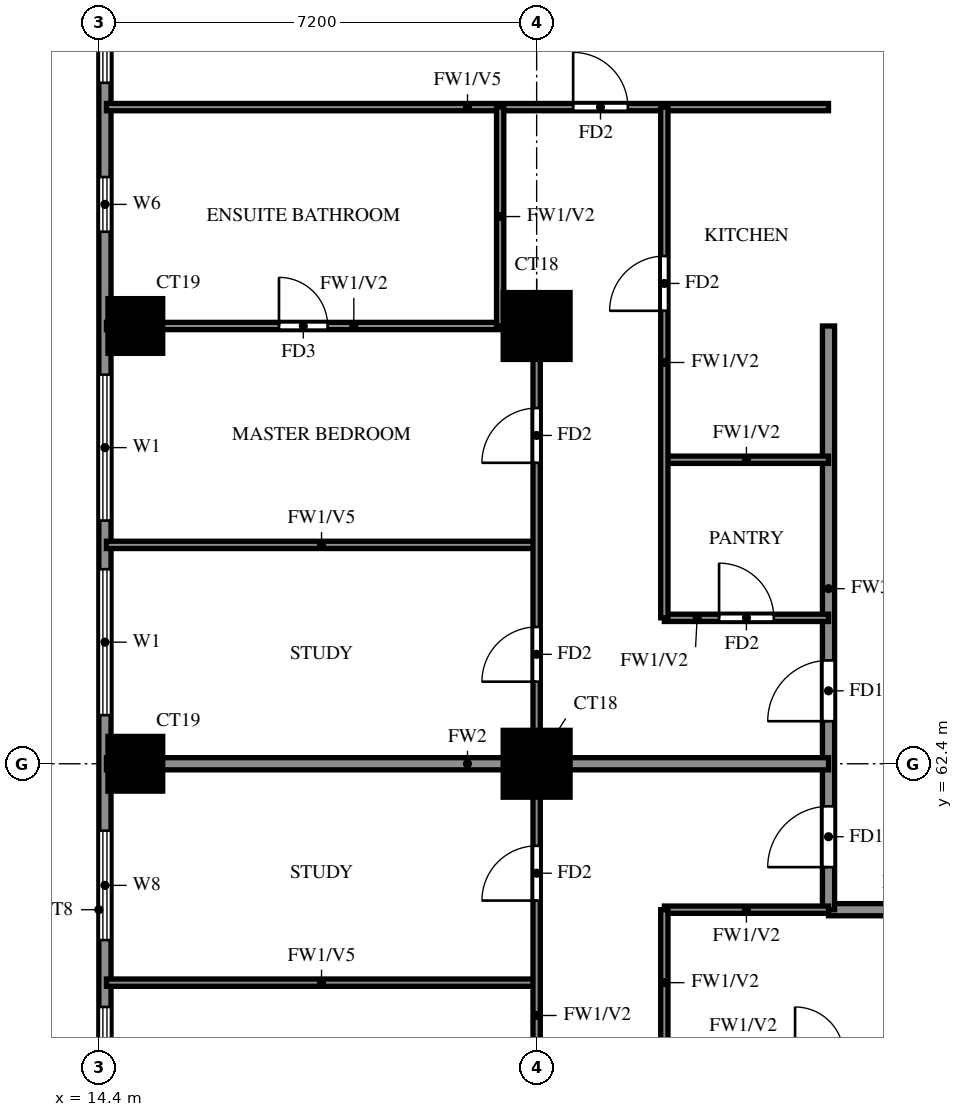
"""IFC4 building model, lengths in metres.
Left out: names, types, materials, properties, quantities, classifications, styles, units other than length and angle.
Written with IfcOpenShell. Run it as: python <this file> out.ifc"""

import sys

from ifc_helpers import new_model, si_unit, direction, frame, frame_2d, origin, origin_2d, place, context, subcontext, project, spatial, rectangle, extrude, source, transform, mapped, element, fill, save


model = new_model("IFC4")
c1 = context("Model", 3, precision=1e-05, world=origin(), true_north=direction((0.0, 1.0)))
c2 = subcontext(c1, "Body", "Model", "MODEL_VIEW")
j1 = project(units=[si_unit("LENGTHUNIT", "METRE"), si_unit("PLANEANGLEUNIT", "RADIAN")], contexts=[c1])
p1 = place(None, origin())
s1 = spatial("IfcSite", under=j1, at=p1, CompositionType="ELEMENT")
p2 = place(p1, origin())
s2 = spatial("IfcBuilding", under=s1, at=p2, CompositionType="ELEMENT")
p3 = place(p2, frame((0.0, 0.0, 113.0)))
s3 = spatial("IfcBuildingStorey", under=s2, at=p3, CompositionType="ELEMENT", Elevation=113.0)
m1 = source(origin(), c2, "Body", "SweptSolid", [
    extrude(rectangle(XDim=0.9, YDim=0.9, at=origin_2d()), origin(), (0.0, 0.0, 1.0), 3.2),
])
p4 = place(p3, frame((15.0, 62.4, 0.0), z_axis=(0.0, 0.0, 1.0), x_axis=(1.0, 0.0, 0.0)))
e1 = element("IfcColumn", 1, at=p4, inside=s3, PredefinedType="COLUMN", context=c2, shape_type="MappedRepresentation", body=[
    mapped(m1, transform((0.0, 0.0, 0.0))),
])
m2 = source(origin(), c2, "Body", "SweptSolid", [
    extrude(rectangle(XDim=1.1, YDim=1.1, at=origin_2d()), origin(), (0.0, 0.0, 1.0), 3.2),
])
p5 = place(p3, frame((21.6, 62.4, 0.0), z_axis=(0.0, 0.0, 1.0), x_axis=(1.0, 0.0, 0.0)))
e2 = element("IfcColumn", 2, at=p5, inside=s3, PredefinedType="COLUMN", context=c2, shape_type="MappedRepresentation", body=[
    mapped(m2, transform((0.0, 0.0, 0.0))),
])
p6 = place(p3, frame((15.0, 69.6, 0.0), z_axis=(0.0, 0.0, 1.0), x_axis=(1.0, 0.0, 0.0)))
e3 = element("IfcColumn", 3, at=p6, inside=s3, PredefinedType="COLUMN", context=c2, shape_type="MappedRepresentation", body=[
    mapped(m1, transform((0.0, 0.0, 0.0))),
])
p7 = place(p3, frame((21.6, 69.6, 0.0), z_axis=(0.0, 0.0, 1.0), x_axis=(1.0, 0.0, 0.0)))
e4 = element("IfcColumn", 4, at=p7, inside=s3, PredefinedType="COLUMN", context=c2, shape_type="MappedRepresentation", body=[
    mapped(m2, transform((0.0, 0.0, 0.0))),
])
p8 = place(p3, frame((14.5, 76.6, 0.0), z_axis=(0.0, 0.0, 1.0), x_axis=(0.0, -1.0, 0.0)))
e5 = element("IfcWall", 5, at=p8, inside=s3, PredefinedType="SOLIDWALL", context=c2, shape_type="SweptSolid", body=[
    extrude(rectangle(XDim=33.4, YDim=0.2, at=frame_2d((16.7, 0.0))), origin(), (0.0, 0.0, 1.0), 3.2),
])
p9 = place(p8, frame((29.9, 0.0, 0.6)))
e6 = element("IfcOpeningElement", 6, at=p9, cuts=e5, PredefinedType="OPENING", context=c2, shape_type="SweptSolid", body=[
    extrude(rectangle(XDim=2.4, YDim=2.4, at=frame_2d((1.2, 1.2))), frame((0.0, 0.11, 0.0), z_axis=(0.0, -1.0, 0.0), x_axis=(1.0, 0.0, 0.0)), (0.0, 0.0, 1.0), 0.22),
])
p10 = place(p8, frame((25.4, 0.0, 0.6)))
e7 = element("IfcOpeningElement", 7, at=p10, cuts=e5, PredefinedType="OPENING", context=c2, shape_type="SweptSolid", body=[
    extrude(rectangle(XDim=2.4, YDim=2.4, at=frame_2d((1.2, 1.2))), frame((0.0, 0.11, 0.0), z_axis=(0.0, -1.0, 0.0), x_axis=(1.0, 0.0, 0.0)), (0.0, 0.0, 1.0), 0.22),
])
p11 = place(p8, frame((18.2, 0.0, 0.6)))
e8 = element("IfcOpeningElement", 8, at=p11, cuts=e5, PredefinedType="OPENING", context=c2, shape_type="SweptSolid", body=[
    extrude(rectangle(XDim=2.4, YDim=2.4, at=frame_2d((1.2, 1.2))), frame((0.0, 0.11, 0.0), z_axis=(0.0, -1.0, 0.0), x_axis=(1.0, 0.0, 0.0)), (0.0, 0.0, 1.0), 0.22),
])
p12 = place(p8, frame((22.5, 0.0, 0.6)))
e9 = element("IfcOpeningElement", 9, at=p12, cuts=e5, PredefinedType="OPENING", context=c2, shape_type="SweptSolid", body=[
    extrude(rectangle(XDim=1.8, YDim=2.4, at=frame_2d((0.9, 1.2))), frame((0.0, 0.11, 0.0), z_axis=(0.0, -1.0, 0.0), x_axis=(1.0, 0.0, 0.0)), (0.0, 0.0, 1.0), 0.22),
])
p13 = place(p8, frame((15.3, 0.0, 0.6)))
e10 = element("IfcOpeningElement", 10, at=p13, cuts=e5, PredefinedType="OPENING", context=c2, shape_type="SweptSolid", body=[
    extrude(rectangle(XDim=1.8, YDim=2.4, at=frame_2d((0.9, 1.2))), frame((0.0, 0.11, 0.0), z_axis=(0.0, -1.0, 0.0), x_axis=(1.0, 0.0, 0.0)), (0.0, 0.0, 1.0), 0.22),
])
p14 = place(p8, frame((11.0, 0.0, 0.6)))
e11 = element("IfcOpeningElement", 11, at=p14, cuts=e5, PredefinedType="OPENING", context=c2, shape_type="SweptSolid", body=[
    extrude(rectangle(XDim=2.4, YDim=2.4, at=frame_2d((1.2, 1.2))), frame((0.0, 0.11, 0.0), z_axis=(0.0, -1.0, 0.0), x_axis=(1.0, 0.0, 0.0)), (0.0, 0.0, 1.0), 0.22),
])
p15 = place(p8, frame((7.8, 0.0, 0.6)))
e12 = element("IfcOpeningElement", 12, at=p15, cuts=e5, PredefinedType="OPENING", context=c2, shape_type="SweptSolid", body=[
    extrude(rectangle(XDim=2.4, YDim=2.4, at=frame_2d((1.2, 1.2))), frame((0.0, 0.11, 0.0), z_axis=(0.0, -1.0, 0.0), x_axis=(1.0, 0.0, 0.0)), (0.0, 0.0, 1.0), 0.22),
])
p16 = place(p8, frame((4.55, 0.0, 1.5)))
e13 = element("IfcOpeningElement", 13, at=p16, cuts=e5, PredefinedType="OPENING", context=c2, shape_type="SweptSolid", body=[
    extrude(rectangle(XDim=0.9, YDim=0.9, at=frame_2d((0.45, 0.45))), frame((0.0, 0.11, 0.0), z_axis=(0.0, -1.0, 0.0), x_axis=(1.0, 0.0, 0.0)), (0.0, 0.0, 1.0), 0.22),
])
p17 = place(p8, frame((0.6, 0.0, 0.6)))
e14 = element("IfcOpeningElement", 14, at=p17, cuts=e5, PredefinedType="OPENING", context=c2, shape_type="SweptSolid", body=[
    extrude(rectangle(XDim=2.4, YDim=2.4, at=frame_2d((1.2, 1.2))), frame((0.0, 0.11, 0.0), z_axis=(0.0, -1.0, 0.0), x_axis=(1.0, 0.0, 0.0)), (0.0, 0.0, 1.0), 0.22),
])
p18 = place(p3, frame((26.4, 60.0, 0.0), z_axis=(0.0, 0.0, 1.0), x_axis=(1.0, 0.0, 0.0)))
e15 = element("IfcWall", 15, at=p18, inside=s3, PredefinedType="SOLIDWALL", context=c2, shape_type="SweptSolid", body=[
    extrude(rectangle(XDim=2.4, YDim=0.2, at=frame_2d((1.2, 0.0))), origin(), (0.0, 0.0, 1.0), 3.2),
])
p19 = place(p3, frame((26.4, 60.0, 0.0), z_axis=(0.0, 0.0, 1.0), x_axis=(0.0, 1.0, 0.0)))
e16 = element("IfcWall", 16, at=p19, inside=s3, PredefinedType="SOLIDWALL", context=c2, shape_type="SweptSolid", body=[
    extrude(rectangle(XDim=9.6, YDim=0.2, at=frame_2d((4.8, 0.0))), origin(), (0.0, 0.0, 1.0), 3.2),
])
p20 = place(p19, frame((0.7, 0.0, 0.0)))
e17 = element("IfcOpeningElement", 17, at=p20, cuts=e16, PredefinedType="OPENING", context=c2, shape_type="SweptSolid", body=[
    extrude(rectangle(XDim=1.0, YDim=2.1, at=frame_2d((0.5, 1.05))), frame((0.0, 0.11, 0.0), z_axis=(0.0, -1.0, 0.0), x_axis=(1.0, 0.0, 0.0)), (0.0, 0.0, 1.0), 0.22),
])
p21 = place(p19, frame((3.1, 0.0, 0.0)))
e18 = element("IfcOpeningElement", 18, at=p21, cuts=e16, PredefinedType="OPENING", context=c2, shape_type="SweptSolid", body=[
    extrude(rectangle(XDim=1.0, YDim=2.1, at=frame_2d((0.5, 1.05))), frame((0.0, 0.11, 0.0), z_axis=(0.0, -1.0, 0.0), x_axis=(1.0, 0.0, 0.0)), (0.0, 0.0, 1.0), 0.22),
])
p22 = place(p3, frame((14.525, 62.4, 0.0), z_axis=(0.0, 0.0, 1.0), x_axis=(1.0, 0.0, 0.0)))
e19 = element("IfcWall", 19, at=p22, inside=s3, PredefinedType="SOLIDWALL", context=c2, shape_type="SweptSolid", body=[
    extrude(rectangle(XDim=11.875, YDim=0.2, at=frame_2d((5.938, 0.0))), origin(), (0.0, 0.0, 1.0), 3.2),
])
p23 = place(p3, frame((14.525, 58.8, 0.0), z_axis=(0.0, 0.0, 1.0), x_axis=(1.0, 0.0, 0.0)))
e20 = element("IfcWall", 20, at=p23, inside=s3, PredefinedType="PARTITIONING", context=c2, shape_type="SweptSolid", body=[
    extrude(rectangle(XDim=7.075, YDim=0.12, at=frame_2d((3.538, 0.0))), origin(), (0.0, 0.0, 1.0), 2.3),
])
p24 = place(p3, frame((23.7, 60.0, 0.0), z_axis=(0.0, 0.0, 1.0), x_axis=(1.0, 0.0, 0.0)))
e21 = element("IfcWall", 21, at=p24, inside=s3, PredefinedType="PARTITIONING", context=c2, shape_type="SweptSolid", body=[
    extrude(rectangle(XDim=2.7, YDim=0.12, at=frame_2d((1.35, 0.0))), origin(), (0.0, 0.0, 1.0), 3.2),
])
p25 = place(p3, frame((23.7, 64.8, 0.0), z_axis=(0.0, 0.0, 1.0), x_axis=(1.0, 0.0, 0.0)))
e22 = element("IfcWall", 22, at=p25, inside=s3, PredefinedType="PARTITIONING", context=c2, shape_type="SweptSolid", body=[
    extrude(rectangle(XDim=2.7, YDim=0.12, at=frame_2d((1.35, 0.0))), origin(), (0.0, 0.0, 1.0), 3.2),
])
p26 = place(p25, frame((0.9, 0.0, 0.0)))
e23 = element("IfcOpeningElement", 23, at=p26, cuts=e22, PredefinedType="OPENING", context=c2, shape_type="SweptSolid", body=[
    extrude(rectangle(XDim=0.9, YDim=2.1, at=frame_2d((0.45, 1.05))), frame((0.0, 0.07, 0.0), z_axis=(0.0, -1.0, 0.0), x_axis=(1.0, 0.0, 0.0)), (0.0, 0.0, 1.0), 0.14),
])
p27 = place(p3, frame((14.525, 66.0, 0.0), z_axis=(0.0, 0.0, 1.0), x_axis=(1.0, 0.0, 0.0)))
e24 = element("IfcWall", 24, at=p27, inside=s3, PredefinedType="PARTITIONING", context=c2, shape_type="SweptSolid", body=[
    extrude(rectangle(XDim=7.075, YDim=0.12, at=frame_2d((3.538, 0.0))), origin(), (0.0, 0.0, 1.0), 2.3),
])
p28 = place(p3, frame((23.7, 67.4, 0.0), z_axis=(0.0, 0.0, 1.0), x_axis=(1.0, 0.0, 0.0)))
e25 = element("IfcWall", 25, at=p28, inside=s3, PredefinedType="PARTITIONING", context=c2, shape_type="SweptSolid", body=[
    extrude(rectangle(XDim=2.7, YDim=0.12, at=frame_2d((1.35, 0.0))), origin(), (0.0, 0.0, 1.0), 3.2),
])
p29 = place(p3, frame((14.525, 69.6, 0.0), z_axis=(0.0, 0.0, 1.0), x_axis=(1.0, 0.0, 0.0)))
e26 = element("IfcWall", 26, at=p29, inside=s3, PredefinedType="PARTITIONING", context=c2, shape_type="SweptSolid", body=[
    extrude(rectangle(XDim=7.075, YDim=0.12, at=frame_2d((3.538, 0.0))), origin(), (0.0, 0.0, 1.0), 3.2),
])
p30 = place(p29, frame((2.837, 0.0, 0.0)))
e27 = element("IfcOpeningElement", 27, at=p30, cuts=e26, PredefinedType="OPENING", context=c2, shape_type="SweptSolid", body=[
    extrude(rectangle(XDim=0.8, YDim=2.1, at=frame_2d((0.4, 1.05))), frame((0.0, 0.07, 0.0), z_axis=(0.0, -1.0, 0.0), x_axis=(1.0, 0.0, 0.0)), (0.0, 0.0, 1.0), 0.14),
])
p31 = place(p3, frame((14.525, 73.2, 0.0), z_axis=(0.0, 0.0, 1.0), x_axis=(1.0, 0.0, 0.0)))
e28 = element("IfcWall", 28, at=p31, inside=s3, PredefinedType="PARTITIONING", context=c2, shape_type="SweptSolid", body=[
    extrude(rectangle(XDim=11.875, YDim=0.12, at=frame_2d((5.938, 0.0))), origin(), (0.0, 0.0, 1.0), 2.3),
])
p32 = place(p31, frame((7.675, 0.0, 0.0)))
e29 = element("IfcOpeningElement", 29, at=p32, cuts=e28, PredefinedType="OPENING", context=c2, shape_type="SweptSolid", body=[
    extrude(rectangle(XDim=0.9, YDim=2.1, at=frame_2d((0.45, 1.05))), frame((0.0, 0.07, 0.0), z_axis=(0.0, -1.0, 0.0), x_axis=(1.0, 0.0, 0.0)), (0.0, 0.0, 1.0), 0.14),
])
p33 = place(p3, frame((21.0, 69.6, 0.0), z_axis=(0.0, 0.0, 1.0), x_axis=(0.0, 1.0, 0.0)))
e30 = element("IfcWall", 30, at=p33, inside=s3, PredefinedType="PARTITIONING", context=c2, shape_type="SweptSolid", body=[
    extrude(rectangle(XDim=3.6, YDim=0.12, at=frame_2d((1.8, 0.0))), origin(), (0.0, 0.0, 1.0), 3.2),
])
p34 = place(p3, frame((21.6, 48.0, 0.0), z_axis=(0.0, 0.0, 1.0), x_axis=(0.0, 1.0, 0.0)))
e31 = element("IfcWall", 31, at=p34, inside=s3, PredefinedType="PARTITIONING", context=c2, shape_type="SweptSolid", body=[
    extrude(rectangle(XDim=21.6, YDim=0.12, at=frame_2d((10.8, 0.0))), origin(), (0.0, 0.0, 1.0), 3.2),
])
p35 = place(p34, frame((1.35, 0.0, 0.0)))
e32 = element("IfcOpeningElement", 32, at=p35, cuts=e31, PredefinedType="OPENING", context=c2, shape_type="SweptSolid", body=[
    extrude(rectangle(XDim=0.9, YDim=2.1, at=frame_2d((0.45, 1.05))), frame((0.0, 0.07, 0.0), z_axis=(0.0, -1.0, 0.0), x_axis=(1.0, 0.0, 0.0)), (0.0, 0.0, 1.0), 0.14),
])
p36 = place(p34, frame((7.95, 0.0, 0.0)))
e33 = element("IfcOpeningElement", 33, at=p36, cuts=e31, PredefinedType="OPENING", context=c2, shape_type="SweptSolid", body=[
    extrude(rectangle(XDim=1.5, YDim=2.1, at=frame_2d((0.75, 1.05))), frame((0.0, 0.07, 0.0), z_axis=(0.0, -1.0, 0.0), x_axis=(1.0, 0.0, 0.0)), (0.0, 0.0, 1.0), 0.14),
])
p37 = place(p34, frame((12.15, 0.0, 0.0)))
e34 = element("IfcOpeningElement", 34, at=p37, cuts=e31, PredefinedType="OPENING", context=c2, shape_type="SweptSolid", body=[
    extrude(rectangle(XDim=0.9, YDim=2.1, at=frame_2d((0.45, 1.05))), frame((0.0, 0.07, 0.0), z_axis=(0.0, -1.0, 0.0), x_axis=(1.0, 0.0, 0.0)), (0.0, 0.0, 1.0), 0.14),
])
p38 = place(p34, frame((15.75, 0.0, 0.0)))
e35 = element("IfcOpeningElement", 35, at=p38, cuts=e31, PredefinedType="OPENING", context=c2, shape_type="SweptSolid", body=[
    extrude(rectangle(XDim=0.9, YDim=2.1, at=frame_2d((0.45, 1.05))), frame((0.0, 0.07, 0.0), z_axis=(0.0, -1.0, 0.0), x_axis=(1.0, 0.0, 0.0)), (0.0, 0.0, 1.0), 0.14),
])
p39 = place(p34, frame((19.35, 0.0, 0.0)))
e36 = element("IfcOpeningElement", 36, at=p39, cuts=e31, PredefinedType="OPENING", context=c2, shape_type="SweptSolid", body=[
    extrude(rectangle(XDim=0.9, YDim=2.1, at=frame_2d((0.45, 1.05))), frame((0.0, 0.07, 0.0), z_axis=(0.0, -1.0, 0.0), x_axis=(1.0, 0.0, 0.0)), (0.0, 0.0, 1.0), 0.14),
])
p40 = place(p3, frame((23.7, 57.6, 0.0), z_axis=(0.0, 0.0, 1.0), x_axis=(0.0, 1.0, 0.0)))
e37 = element("IfcWall", 37, at=p40, inside=s3, PredefinedType="PARTITIONING", context=c2, shape_type="SweptSolid", body=[
    extrude(rectangle(XDim=2.4, YDim=0.12, at=frame_2d((1.2, 0.0))), origin(), (0.0, 0.0, 1.0), 3.2),
])
p41 = place(p3, frame((23.7, 64.8, 0.0), z_axis=(0.0, 0.0, 1.0), x_axis=(0.0, 1.0, 0.0)))
e38 = element("IfcWall", 38, at=p41, inside=s3, PredefinedType="PARTITIONING", context=c2, shape_type="SweptSolid", body=[
    extrude(rectangle(XDim=8.4, YDim=0.12, at=frame_2d((4.2, 0.0))), origin(), (0.0, 0.0, 1.0), 3.2),
])
p42 = place(p41, frame((5.05, 0.0, 0.0)))
e39 = element("IfcOpeningElement", 39, at=p42, cuts=e38, PredefinedType="OPENING", context=c2, shape_type="SweptSolid", body=[
    extrude(rectangle(XDim=0.9, YDim=2.1, at=frame_2d((0.45, 1.05))), frame((0.0, 0.07, 0.0), z_axis=(0.0, -1.0, 0.0), x_axis=(1.0, 0.0, 0.0)), (0.0, 0.0, 1.0), 0.14),
])
p43 = place(p11, origin())
e40 = element("IfcWindow", 40, at=p43, inside=s3, PartitioningType="DOUBLE_PANEL_VERTICAL", PredefinedType="WINDOW", context=c2, shape_type="SweptSolid", body=[
    extrude(rectangle(XDim=2.4, YDim=2.4, at=frame_2d((1.2, 1.2))), frame((0.0, 0.03, 0.0), z_axis=(0.0, -1.0, 0.0), x_axis=(1.0, 0.0, 0.0)), (0.0, 0.0, 1.0), 0.06),
])
fill(e8, e40)
p44 = place(p13, origin())
e41 = element("IfcWindow", 41, at=p44, inside=s3, PartitioningType="DOUBLE_PANEL_VERTICAL", PredefinedType="WINDOW", context=c2, shape_type="SweptSolid", body=[
    extrude(rectangle(XDim=1.8, YDim=2.4, at=frame_2d((0.9, 1.2))), frame((0.0, 0.03, 0.0), z_axis=(0.0, -1.0, 0.0), x_axis=(1.0, 0.0, 0.0)), (0.0, 0.0, 1.0), 0.06),
])
fill(e10, e41)
p45 = place(p14, origin())
e42 = element("IfcWindow", 42, at=p45, inside=s3, PartitioningType="DOUBLE_PANEL_VERTICAL", PredefinedType="WINDOW", context=c2, shape_type="SweptSolid", body=[
    extrude(rectangle(XDim=2.4, YDim=2.4, at=frame_2d((1.2, 1.2))), frame((0.0, 0.03, 0.0), z_axis=(0.0, -1.0, 0.0), x_axis=(1.0, 0.0, 0.0)), (0.0, 0.0, 1.0), 0.06),
])
fill(e11, e42)
p46 = place(p15, origin())
e43 = element("IfcWindow", 43, at=p46, inside=s3, PartitioningType="DOUBLE_PANEL_VERTICAL", PredefinedType="WINDOW", context=c2, shape_type="SweptSolid", body=[
    extrude(rectangle(XDim=2.4, YDim=2.4, at=frame_2d((1.2, 1.2))), frame((0.0, 0.03, 0.0), z_axis=(0.0, -1.0, 0.0), x_axis=(1.0, 0.0, 0.0)), (0.0, 0.0, 1.0), 0.06),
])
fill(e12, e43)
p47 = place(p16, origin())
e44 = element("IfcWindow", 44, at=p47, inside=s3, PartitioningType="SINGLE_PANEL", PredefinedType="WINDOW", context=c2, shape_type="SweptSolid", body=[
    extrude(rectangle(XDim=0.9, YDim=0.9, at=frame_2d((0.45, 0.45))), frame((0.0, 0.03, 0.0), z_axis=(0.0, -1.0, 0.0), x_axis=(1.0, 0.0, 0.0)), (0.0, 0.0, 1.0), 0.06),
])
fill(e13, e44)
p48 = place(p17, origin())
e45 = element("IfcWindow", 45, at=p48, inside=s3, PartitioningType="DOUBLE_PANEL_VERTICAL", PredefinedType="WINDOW", context=c2, shape_type="SweptSolid", body=[
    extrude(rectangle(XDim=2.4, YDim=2.4, at=frame_2d((1.2, 1.2))), frame((0.0, 0.03, 0.0), z_axis=(0.0, -1.0, 0.0), x_axis=(1.0, 0.0, 0.0)), (0.0, 0.0, 1.0), 0.06),
])
fill(e14, e45)
p49 = place(p20, origin())
e46 = element("IfcDoor", 46, at=p49, inside=s3, OperationType="SINGLE_SWING_RIGHT", PredefinedType="DOOR", context=c2, shape_type="SweptSolid", body=[
    extrude(rectangle(XDim=1.0, YDim=2.1, at=frame_2d((0.5, 1.05))), frame((0.0, 0.025, 0.0), z_axis=(0.0, -1.0, 0.0), x_axis=(1.0, 0.0, 0.0)), (0.0, 0.0, 1.0), 0.05),
])
fill(e17, e46)
p50 = place(p37, origin())
e47 = element("IfcDoor", 47, at=p50, inside=s3, OperationType="SINGLE_SWING_RIGHT", PredefinedType="DOOR", context=c2, shape_type="SweptSolid", body=[
    extrude(rectangle(XDim=0.9, YDim=2.1, at=frame_2d((0.45, 1.05))), frame((0.0, 0.025, 0.0), z_axis=(0.0, -1.0, 0.0), x_axis=(1.0, 0.0, 0.0)), (0.0, 0.0, 1.0), 0.05),
])
fill(e34, e47)
p51 = place(p21, origin())
e48 = element("IfcDoor", 48, at=p51, inside=s3, OperationType="SINGLE_SWING_LEFT", PredefinedType="DOOR", context=c2, shape_type="SweptSolid", body=[
    extrude(rectangle(XDim=1.0, YDim=2.1, at=frame_2d((0.5, 1.05))), frame((0.0, 0.025, 0.0), z_axis=(0.0, -1.0, 0.0), x_axis=(1.0, 0.0, 0.0)), (0.0, 0.0, 1.0), 0.05),
])
fill(e18, e48)
p52 = place(p38, origin())
e49 = element("IfcDoor", 49, at=p52, inside=s3, OperationType="SINGLE_SWING_RIGHT", PredefinedType="DOOR", context=c2, shape_type="SweptSolid", body=[
    extrude(rectangle(XDim=0.9, YDim=2.1, at=frame_2d((0.45, 1.05))), frame((0.0, 0.025, 0.0), z_axis=(0.0, -1.0, 0.0), x_axis=(1.0, 0.0, 0.0)), (0.0, 0.0, 1.0), 0.05),
])
fill(e35, e49)
p53 = place(p39, origin())
e50 = element("IfcDoor", 50, at=p53, inside=s3, OperationType="SINGLE_SWING_LEFT", PredefinedType="DOOR", context=c2, shape_type="SweptSolid", body=[
    extrude(rectangle(XDim=0.9, YDim=2.1, at=frame_2d((0.45, 1.05))), frame((0.0, 0.025, 0.0), z_axis=(0.0, -1.0, 0.0), x_axis=(1.0, 0.0, 0.0)), (0.0, 0.0, 1.0), 0.05),
])
fill(e36, e50)
p54 = place(p30, origin())
e51 = element("IfcDoor", 51, at=p54, inside=s3, OperationType="SINGLE_SWING_LEFT", PredefinedType="DOOR", context=c2, shape_type="SweptSolid", body=[
    extrude(rectangle(XDim=0.8, YDim=2.1, at=frame_2d((0.4, 1.05))), frame((0.0, 0.025, 0.0), z_axis=(0.0, -1.0, 0.0), x_axis=(1.0, 0.0, 0.0)), (0.0, 0.0, 1.0), 0.05),
])
fill(e27, e51)
p55 = place(p32, origin())
e52 = element("IfcDoor", 52, at=p55, inside=s3, OperationType="SINGLE_SWING_RIGHT", PredefinedType="DOOR", context=c2, shape_type="SweptSolid", body=[
    extrude(rectangle(XDim=0.9, YDim=2.1, at=frame_2d((0.45, 1.05))), frame((0.0, 0.025, 0.0), z_axis=(0.0, -1.0, 0.0), x_axis=(1.0, 0.0, 0.0)), (0.0, 0.0, 1.0), 0.05),
])
fill(e29, e52)
p56 = place(p26, origin())
e53 = element("IfcDoor", 53, at=p56, inside=s3, OperationType="SINGLE_SWING_LEFT", PredefinedType="DOOR", context=c2, shape_type="SweptSolid", body=[
    extrude(rectangle(XDim=0.9, YDim=2.1, at=frame_2d((0.45, 1.05))), frame((0.0, 0.025, 0.0), z_axis=(0.0, -1.0, 0.0), x_axis=(1.0, 0.0, 0.0)), (0.0, 0.0, 1.0), 0.05),
])
fill(e23, e53)
p57 = place(p42, origin())
e54 = element("IfcDoor", 54, at=p57, inside=s3, OperationType="SINGLE_SWING_LEFT", PredefinedType="DOOR", context=c2, shape_type="SweptSolid", body=[
    extrude(rectangle(XDim=0.9, YDim=2.1, at=frame_2d((0.45, 1.05))), frame((0.0, 0.025, 0.0), z_axis=(0.0, -1.0, 0.0), x_axis=(1.0, 0.0, 0.0)), (0.0, 0.0, 1.0), 0.05),
])
fill(e39, e54)
save(model, sys.argv[1])
